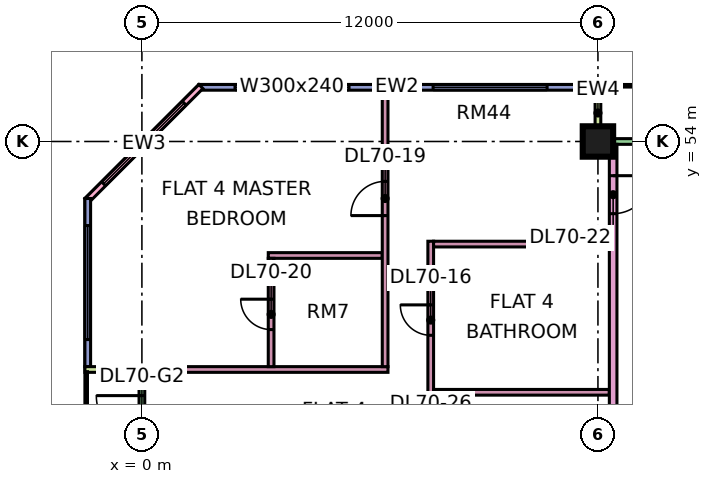
"""IFC4 building model, lengths in metres.
Left out: names, types, materials, properties, quantities, classifications, styles, units other than length and angle.
Written with IfcOpenShell. Run it as: python <this file> out.ifc"""

import sys

from ifc_helpers import new_model, si_unit, direction, frame, frame_2d, origin, origin_2d, place, context, subcontext, project, spatial, rectangle, extrude, element, fill, save


model = new_model("IFC4")
c1 = context("Model", 3, precision=1e-05, world=origin(), true_north=direction((0.0, 1.0)))
c2 = subcontext(c1, "Body", "Model", "MODEL_VIEW")
j1 = project(units=[si_unit("LENGTHUNIT", "METRE"), si_unit("PLANEANGLEUNIT", "RADIAN")], contexts=[c1])
p1 = place(None, origin())
s1 = spatial("IfcSite", under=j1, at=p1, CompositionType="ELEMENT")
p2 = place(p1, origin())
s2 = spatial("IfcBuilding", under=s1, at=p2, CompositionType="ELEMENT")
p3 = place(p2, frame((0.0, 0.0, 299.65)))
s3 = spatial("IfcBuildingStorey", under=s2, at=p3, CompositionType="ELEMENT", Elevation=299.65)
p4 = place(p3, frame((12.0, 54.0, 0.0), z_axis=(0.0, 0.0, 1.0), x_axis=(1.0, 0.0, 0.0)))
e1 = element("IfcColumn", 1, at=p4, inside=s3, PredefinedType="COLUMN", context=c2, shape_type="SweptSolid", body=[
    extrude(rectangle(XDim=0.8, YDim=0.8, at=origin_2d()), origin(), (0.0, 0.0, 1.0), 3.75),
])
p5 = place(p3, frame((22.425, 54.0, 0.0), z_axis=(0.0, 0.0, 1.0), x_axis=(-1.0, 0.0, 0.0)))
e2 = element("IfcWall", 2, at=p5, inside=s3, PredefinedType="SOLIDWALL", context=c2, shape_type="SweptSolid", body=[
    extrude(rectangle(XDim=10.35, YDim=0.15, at=frame_2d((5.175, 0.0))), origin(), (0.0, 0.0, 1.0), 3.35),
])
p6 = place(p5, frame((1.012, 0.0, 0.45)))
e3 = element("IfcOpeningElement", 3, at=p6, cuts=e2, PredefinedType="OPENING", context=c2, shape_type="SweptSolid", body=[
    extrude(rectangle(XDim=4.8, YDim=2.4, at=frame_2d((2.4, 1.2))), frame((0.0, 0.085, 0.0), z_axis=(0.0, -1.0, 0.0), x_axis=(1.0, 0.0, 0.0)), (0.0, 0.0, 1.0), 0.17),
])
p7 = place(p3, frame((12.0, 55.5, 0.0), z_axis=(0.0, 0.0, 1.0), x_axis=(0.0, -1.0, 0.0)))
e4 = element("IfcWall", 4, at=p7, inside=s3, PredefinedType="SOLIDWALL", context=c2, shape_type="SweptSolid", body=[
    extrude(rectangle(XDim=1.5, YDim=0.15, at=frame_2d((0.75, 0.0))), origin(), (0.0, 0.0, 1.0), 3.35),
])
p8 = place(p3, frame((11.925, 55.425, 0.0), z_axis=(0.0, 0.0, 1.0), x_axis=(-1.0, 0.0, 0.0)))
e5 = element("IfcWall", 5, at=p8, inside=s3, PredefinedType="SOLIDWALL", context=c2, shape_type="SweptSolid", body=[
    extrude(rectangle(XDim=10.425, YDim=0.15, at=frame_2d((5.212, 0.0))), origin(), (0.0, 0.0, 1.0), 3.35),
])
p9 = place(p8, frame((1.262, 0.0, 0.45)))
e6 = element("IfcOpeningElement", 6, at=p9, cuts=e5, PredefinedType="OPENING", context=c2, shape_type="SweptSolid", body=[
    extrude(rectangle(XDim=3.0, YDim=2.4, at=frame_2d((1.5, 1.2))), frame((0.0, 0.085, 0.0), z_axis=(0.0, -1.0, 0.0), x_axis=(1.0, 0.0, 0.0)), (0.0, 0.0, 1.0), 0.17),
])
p10 = place(p8, frame((6.475, 0.0, 0.45)))
e7 = element("IfcOpeningElement", 7, at=p10, cuts=e5, PredefinedType="OPENING", context=c2, shape_type="SweptSolid", body=[
    extrude(rectangle(XDim=3.0, YDim=2.4, at=frame_2d((1.5, 1.2))), frame((0.0, 0.085, 0.0), z_axis=(0.0, -1.0, 0.0), x_axis=(1.0, 0.0, 0.0)), (0.0, 0.0, 1.0), 0.17),
])
p11 = place(p3, frame((1.553, 55.447, 0.0), z_axis=(0.0, 0.0, 1.0), x_axis=(-0.707106781187, -0.707106781187, 0.0)))
e8 = element("IfcWall", 8, at=p11, inside=s3, PredefinedType="SOLIDWALL", context=c2, shape_type="SweptSolid", body=[
    extrude(rectangle(XDim=4.243, YDim=0.15, at=frame_2d((2.121, 0.0))), origin(), (0.0, 0.0, 1.0), 3.35),
])
p12 = place(p11, frame((0.621, 0.0, 0.45)))
e9 = element("IfcOpeningElement", 9, at=p12, cuts=e8, PredefinedType="OPENING", context=c2, shape_type="SweptSolid", body=[
    extrude(rectangle(XDim=3.0, YDim=2.4, at=frame_2d((1.5, 1.2))), frame((0.0, 0.085, 0.0), z_axis=(0.0, -1.0, 0.0), x_axis=(1.0, 0.0, 0.0)), (0.0, 0.0, 1.0), 0.17),
])
p13 = place(p3, frame((-1.425, 52.5, 0.0), z_axis=(0.0, 0.0, 1.0), x_axis=(0.0, -1.0, 0.0)))
e10 = element("IfcWall", 10, at=p13, inside=s3, PredefinedType="SOLIDWALL", context=c2, shape_type="SweptSolid", body=[
    extrude(rectangle(XDim=4.425, YDim=0.15, at=frame_2d((2.212, 0.0))), origin(), (0.0, 0.0, 1.0), 3.35),
])
p14 = place(p13, frame((0.712, 0.0, 0.45)))
e11 = element("IfcOpeningElement", 11, at=p14, cuts=e10, PredefinedType="OPENING", context=c2, shape_type="SweptSolid", body=[
    extrude(rectangle(XDim=3.0, YDim=2.4, at=frame_2d((1.5, 1.2))), frame((0.0, 0.085, 0.0), z_axis=(0.0, -1.0, 0.0), x_axis=(1.0, 0.0, 0.0)), (0.0, 0.0, 1.0), 0.17),
])
p15 = place(p3, frame((0.0, 47.925, 0.0), z_axis=(0.0, 0.0, 1.0), x_axis=(0.0, -1.0, 0.0)))
e12 = element("IfcWall", 12, at=p15, inside=s3, PredefinedType="SOLIDWALL", context=c2, shape_type="SweptSolid", body=[
    extrude(rectangle(XDim=11.85, YDim=0.15, at=frame_2d((5.925, 0.0))), origin(), (0.0, 0.0, 1.0), 3.35),
])
p16 = place(p15, frame((0.613, 0.0, 0.0)))
e13 = element("IfcOpeningElement", 13, at=p16, cuts=e12, PredefinedType="OPENING", context=c2, shape_type="SweptSolid", body=[
    extrude(rectangle(XDim=1.2, YDim=2.4, at=frame_2d((0.6, 1.2))), frame((0.0, 0.085, 0.0), z_axis=(0.0, -1.0, 0.0), x_axis=(1.0, 0.0, 0.0)), (0.0, 0.0, 1.0), 0.17),
])
p17 = place(p15, frame((3.775, 0.0, 0.45)))
e14 = element("IfcOpeningElement", 14, at=p17, cuts=e12, PredefinedType="OPENING", context=c2, shape_type="SweptSolid", body=[
    extrude(rectangle(XDim=1.8, YDim=2.4, at=frame_2d((0.9, 1.2))), frame((0.0, 0.085, 0.0), z_axis=(0.0, -1.0, 0.0), x_axis=(1.0, 0.0, 0.0)), (0.0, 0.0, 1.0), 0.17),
])
p18 = place(p15, frame((6.525, 0.0, 0.45)))
e15 = element("IfcOpeningElement", 15, at=p18, cuts=e12, PredefinedType="OPENING", context=c2, shape_type="SweptSolid", body=[
    extrude(rectangle(XDim=1.8, YDim=2.4, at=frame_2d((0.9, 1.2))), frame((0.0, 0.085, 0.0), z_axis=(0.0, -1.0, 0.0), x_axis=(1.0, 0.0, 0.0)), (0.0, 0.0, 1.0), 0.17),
])
p19 = place(p15, frame((9.275, 0.0, 0.45)))
e16 = element("IfcOpeningElement", 16, at=p19, cuts=e12, PredefinedType="OPENING", context=c2, shape_type="SweptSolid", body=[
    extrude(rectangle(XDim=1.8, YDim=2.4, at=frame_2d((0.9, 1.2))), frame((0.0, 0.085, 0.0), z_axis=(0.0, -1.0, 0.0), x_axis=(1.0, 0.0, 0.0)), (0.0, 0.0, 1.0), 0.17),
])
p20 = place(p3, frame((-1.5, 48.0, 0.0), z_axis=(0.0, 0.0, 1.0), x_axis=(1.0, 0.0, 0.0)))
e17 = element("IfcWall", 17, at=p20, inside=s3, PredefinedType="SOLIDWALL", context=c2, shape_type="SweptSolid", body=[
    extrude(rectangle(XDim=1.5, YDim=0.15, at=frame_2d((0.75, 0.0))), origin(), (0.0, 0.0, 1.0), 3.35),
])
p21 = place(p3, frame((0.0, 48.0, 0.0), z_axis=(0.0, 0.0, 1.0), x_axis=(1.0, 0.0, 0.0)))
e18 = element("IfcWall", 18, at=p21, inside=s3, PredefinedType="PARTITIONING", context=c2, shape_type="SweptSolid", body=[
    extrude(rectangle(XDim=6.475, YDim=0.15, at=frame_2d((3.238, 0.0))), origin(), (0.0, 0.0, 1.0), 3.35),
])
p22 = place(p3, frame((3.325, 51.0, 0.0), z_axis=(0.0, 0.0, 1.0), x_axis=(1.0, 0.0, 0.0)))
e19 = element("IfcWall", 19, at=p22, inside=s3, PredefinedType="PARTITIONING", context=c2, shape_type="SweptSolid", body=[
    extrude(rectangle(XDim=3.0, YDim=0.15, at=frame_2d((1.5, 0.0))), origin(), (0.0, 0.0, 1.0), 3.35),
])
p23 = place(p3, frame((3.4, 48.075, 0.0), z_axis=(0.0, 0.0, 1.0), x_axis=(0.0, 1.0, 0.0)))
e20 = element("IfcWall", 20, at=p23, inside=s3, PredefinedType="PARTITIONING", context=c2, shape_type="SweptSolid", body=[
    extrude(rectangle(XDim=2.85, YDim=0.15, at=frame_2d((1.425, 0.0))), origin(), (0.0, 0.0, 1.0), 3.35),
])
p24 = place(p23, frame((0.975, 0.0, 0.0)))
e21 = element("IfcOpeningElement", 21, at=p24, cuts=e20, PredefinedType="OPENING", context=c2, shape_type="SweptSolid", body=[
    extrude(rectangle(XDim=0.8, YDim=2.1, at=frame_2d((0.4, 1.05))), frame((0.0, 0.085, 0.0), z_axis=(0.0, -1.0, 0.0), x_axis=(1.0, 0.0, 0.0)), (0.0, 0.0, 1.0), 0.17),
])
p25 = place(p3, frame((6.4, 48.075, 0.0), z_axis=(0.0, 0.0, 1.0), x_axis=(0.0, 1.0, 0.0)))
e22 = element("IfcWall", 22, at=p25, inside=s3, PredefinedType="PARTITIONING", context=c2, shape_type="SweptSolid", body=[
    extrude(rectangle(XDim=7.275, YDim=0.15, at=frame_2d((3.638, 0.0))), origin(), (0.0, 0.0, 1.0), 3.35),
])
p26 = place(p25, frame((3.975, 0.0, 0.0)))
e23 = element("IfcOpeningElement", 23, at=p26, cuts=e22, PredefinedType="OPENING", context=c2, shape_type="SweptSolid", body=[
    extrude(rectangle(XDim=0.9, YDim=2.1, at=frame_2d((0.45, 1.05))), frame((0.0, 0.085, 0.0), z_axis=(0.0, -1.0, 0.0), x_axis=(1.0, 0.0, 0.0)), (0.0, 0.0, 1.0), 0.17),
])
p27 = place(p3, frame((7.6, 36.1, 0.0), z_axis=(0.0, 0.0, 1.0), x_axis=(0.0, 1.0, 0.0)))
e24 = element("IfcWall", 24, at=p27, inside=s3, PredefinedType="PARTITIONING", context=c2, shape_type="SweptSolid", body=[
    extrude(rectangle(XDim=15.275, YDim=0.15, at=frame_2d((7.637, 0.0))), origin(), (0.0, 0.0, 1.0), 3.35),
])
p28 = place(p27, frame((12.8, 0.0, 0.0)))
e25 = element("IfcOpeningElement", 25, at=p28, cuts=e24, PredefinedType="OPENING", context=c2, shape_type="SweptSolid", body=[
    extrude(rectangle(XDim=0.8, YDim=2.1, at=frame_2d((0.4, 1.05))), frame((0.0, 0.085, 0.0), z_axis=(0.0, -1.0, 0.0), x_axis=(1.0, 0.0, 0.0)), (0.0, 0.0, 1.0), 0.17),
])
p29 = place(p27, frame((2.6, 0.0, 0.0)))
e26 = element("IfcOpeningElement", 26, at=p29, cuts=e24, PredefinedType="OPENING", context=c2, shape_type="SweptSolid", body=[
    extrude(rectangle(XDim=0.9, YDim=2.1, at=frame_2d((0.45, 1.05))), frame((0.0, 0.085, 0.0), z_axis=(0.0, -1.0, 0.0), x_axis=(1.0, 0.0, 0.0)), (0.0, 0.0, 1.0), 0.17),
])
p30 = place(p27, frame((6.95, 0.0, 0.0)))
e27 = element("IfcOpeningElement", 27, at=p30, cuts=e24, PredefinedType="OPENING", context=c2, shape_type="SweptSolid", body=[
    extrude(rectangle(XDim=0.8, YDim=2.1, at=frame_2d((0.4, 1.05))), frame((0.0, 0.085, 0.0), z_axis=(0.0, -1.0, 0.0), x_axis=(1.0, 0.0, 0.0)), (0.0, 0.0, 1.0), 0.17),
])
p31 = place(p27, frame((9.5, 0.0, 0.0)))
e28 = element("IfcOpeningElement", 28, at=p31, cuts=e24, PredefinedType="OPENING", context=c2, shape_type="SweptSolid", body=[
    extrude(rectangle(XDim=0.8, YDim=2.1, at=frame_2d((0.4, 1.05))), frame((0.0, 0.085, 0.0), z_axis=(0.0, -1.0, 0.0), x_axis=(1.0, 0.0, 0.0)), (0.0, 0.0, 1.0), 0.17),
])
for number, where, z_axis, x_axis in (
    (29, (7.675, 47.4, 0.0), (0.0, 0.0, 1.0), (1.0, 0.0, 0.0)),
    (30, (7.675, 51.3, 0.0), (0.0, 0.0, 1.0), (1.0, 0.0, 0.0)),
):
    element("IfcWall", number, at=place(p3, frame(where, z_axis=z_axis, x_axis=x_axis)), inside=s3, PredefinedType="PARTITIONING", context=c2, shape_type="SweptSolid", body=[
        extrude(rectangle(XDim=4.625, YDim=0.15, at=frame_2d((2.312, 0.0))), origin(), (0.0, 0.0, 1.0), 3.35),
    ])
p32 = place(p3, frame((12.4, 20.0, 0.0), z_axis=(0.0, 0.0, 1.0), x_axis=(0.0, 1.0, 0.0)))
e31 = element("IfcWall", 31, at=p32, inside=s3, PredefinedType="PARTITIONING", context=c2, shape_type="SweptSolid", body=[
    extrude(rectangle(XDim=33.926, YDim=0.2, at=frame_2d((16.963, 0.0))), origin(), (0.0, 0.0, 1.0), 3.35),
])
p33 = place(p32, frame((32.1, 0.0, 0.0)))
e32 = element("IfcOpeningElement", 32, at=p33, cuts=e31, PredefinedType="OPENING", context=c2, shape_type="SweptSolid", body=[
    extrude(rectangle(XDim=1.0, YDim=2.1, at=frame_2d((0.5, 1.05))), frame((0.0, 0.11, 0.0), z_axis=(0.0, -1.0, 0.0), x_axis=(1.0, 0.0, 0.0)), (0.0, 0.0, 1.0), 0.22),
])
p34 = place(p32, frame((0.6, 0.0, 0.0)))
e33 = element("IfcOpeningElement", 33, at=p34, cuts=e31, PredefinedType="OPENING", context=c2, shape_type="SweptSolid", body=[
    extrude(rectangle(XDim=1.2, YDim=2.1, at=frame_2d((0.6, 1.05))), frame((0.0, 0.11, 0.0), z_axis=(0.0, -1.0, 0.0), x_axis=(1.0, 0.0, 0.0)), (0.0, 0.0, 1.0), 0.22),
])
p35 = place(p32, frame((14.1, 0.0, 0.0)))
e34 = element("IfcOpeningElement", 34, at=p35, cuts=e31, PredefinedType="OPENING", context=c2, shape_type="SweptSolid", body=[
    extrude(rectangle(XDim=1.0, YDim=2.1, at=frame_2d((0.5, 1.05))), frame((0.0, 0.11, 0.0), z_axis=(0.0, -1.0, 0.0), x_axis=(1.0, 0.0, 0.0)), (0.0, 0.0, 1.0), 0.22),
])
p36 = place(p9, origin())
e35 = element("IfcWindow", 35, at=p36, inside=s3, PartitioningType="SINGLE_PANEL", PredefinedType="WINDOW", context=c2, shape_type="SweptSolid", body=[
    extrude(rectangle(XDim=3.0, YDim=2.4, at=frame_2d((1.5, 1.2))), frame((0.0, 0.03, 0.0), z_axis=(0.0, -1.0, 0.0), x_axis=(1.0, 0.0, 0.0)), (0.0, 0.0, 1.0), 0.06),
])
fill(e6, e35)
p37 = place(p10, origin())
e36 = element("IfcWindow", 36, at=p37, inside=s3, PartitioningType="SINGLE_PANEL", PredefinedType="WINDOW", context=c2, shape_type="SweptSolid", body=[
    extrude(rectangle(XDim=3.0, YDim=2.4, at=frame_2d((1.5, 1.2))), frame((0.0, 0.03, 0.0), z_axis=(0.0, -1.0, 0.0), x_axis=(1.0, 0.0, 0.0)), (0.0, 0.0, 1.0), 0.06),
])
fill(e7, e36)
p38 = place(p12, origin())
e37 = element("IfcWindow", 37, at=p38, inside=s3, PartitioningType="SINGLE_PANEL", PredefinedType="WINDOW", context=c2, shape_type="SweptSolid", body=[
    extrude(rectangle(XDim=3.0, YDim=2.4, at=frame_2d((1.5, 1.2))), frame((0.0, 0.03, 0.0), z_axis=(0.0, -1.0, 0.0), x_axis=(1.0, 0.0, 0.0)), (0.0, 0.0, 1.0), 0.06),
])
fill(e9, e37)
p39 = place(p14, origin())
e38 = element("IfcWindow", 38, at=p39, inside=s3, PartitioningType="SINGLE_PANEL", PredefinedType="WINDOW", context=c2, shape_type="SweptSolid", body=[
    extrude(rectangle(XDim=3.0, YDim=2.4, at=frame_2d((1.5, 1.2))), frame((0.0, 0.03, 0.0), z_axis=(0.0, -1.0, 0.0), x_axis=(1.0, 0.0, 0.0)), (0.0, 0.0, 1.0), 0.06),
])
fill(e11, e38)
p40 = place(p16, frame((1.2, 0.0, 0.0), z_axis=(0.0, 0.0, 1.0), x_axis=(-1.0, 0.0, 0.0)))
e39 = element("IfcDoor", 39, at=p40, inside=s3, OperationType="DOUBLE_DOOR_SINGLE_SWING", PredefinedType="DOOR", context=c2, shape_type="SweptSolid", body=[
    extrude(rectangle(XDim=1.2, YDim=2.4, at=frame_2d((0.6, 1.2))), frame((0.0, 0.025, 0.0), z_axis=(0.0, -1.0, 0.0), x_axis=(1.0, 0.0, 0.0)), (0.0, 0.0, 1.0), 0.05),
])
fill(e13, e39)
p41 = place(p28, frame((0.8, 0.0, 0.0), z_axis=(0.0, 0.0, 1.0), x_axis=(-1.0, 0.0, 0.0)))
e40 = element("IfcDoor", 40, at=p41, inside=s3, OperationType="SINGLE_SWING_RIGHT", PredefinedType="DOOR", context=c2, shape_type="SweptSolid", body=[
    extrude(rectangle(XDim=0.8, YDim=2.1, at=frame_2d((0.4, 1.05))), frame((0.0, 0.025, 0.0), z_axis=(0.0, -1.0, 0.0), x_axis=(1.0, 0.0, 0.0)), (0.0, 0.0, 1.0), 0.05),
])
fill(e25, e40)
p42 = place(p26, origin())
e41 = element("IfcDoor", 41, at=p42, inside=s3, OperationType="SINGLE_SWING_LEFT", PredefinedType="DOOR", context=c2, shape_type="SweptSolid", body=[
    extrude(rectangle(XDim=0.9, YDim=2.1, at=frame_2d((0.45, 1.05))), frame((0.0, 0.025, 0.0), z_axis=(0.0, -1.0, 0.0), x_axis=(1.0, 0.0, 0.0)), (0.0, 0.0, 1.0), 0.05),
])
fill(e23, e41)
p43 = place(p24, frame((0.8, 0.0, 0.0), z_axis=(0.0, 0.0, 1.0), x_axis=(-1.0, 0.0, 0.0)))
e42 = element("IfcDoor", 42, at=p43, inside=s3, OperationType="SINGLE_SWING_RIGHT", PredefinedType="DOOR", context=c2, shape_type="SweptSolid", body=[
    extrude(rectangle(XDim=0.8, YDim=2.1, at=frame_2d((0.4, 1.05))), frame((0.0, 0.025, 0.0), z_axis=(0.0, -1.0, 0.0), x_axis=(1.0, 0.0, 0.0)), (0.0, 0.0, 1.0), 0.05),
])
fill(e21, e42)
p44 = place(p33, origin())
e43 = element("IfcDoor", 43, at=p44, inside=s3, OperationType="SINGLE_SWING_RIGHT", PredefinedType="DOOR", context=c2, shape_type="SweptSolid", body=[
    extrude(rectangle(XDim=1.0, YDim=2.1, at=frame_2d((0.5, 1.05))), frame((0.0, 0.025, 0.0), z_axis=(0.0, -1.0, 0.0), x_axis=(1.0, 0.0, 0.0)), (0.0, 0.0, 1.0), 0.05),
])
fill(e32, e43)
save(model, sys.argv[1])
